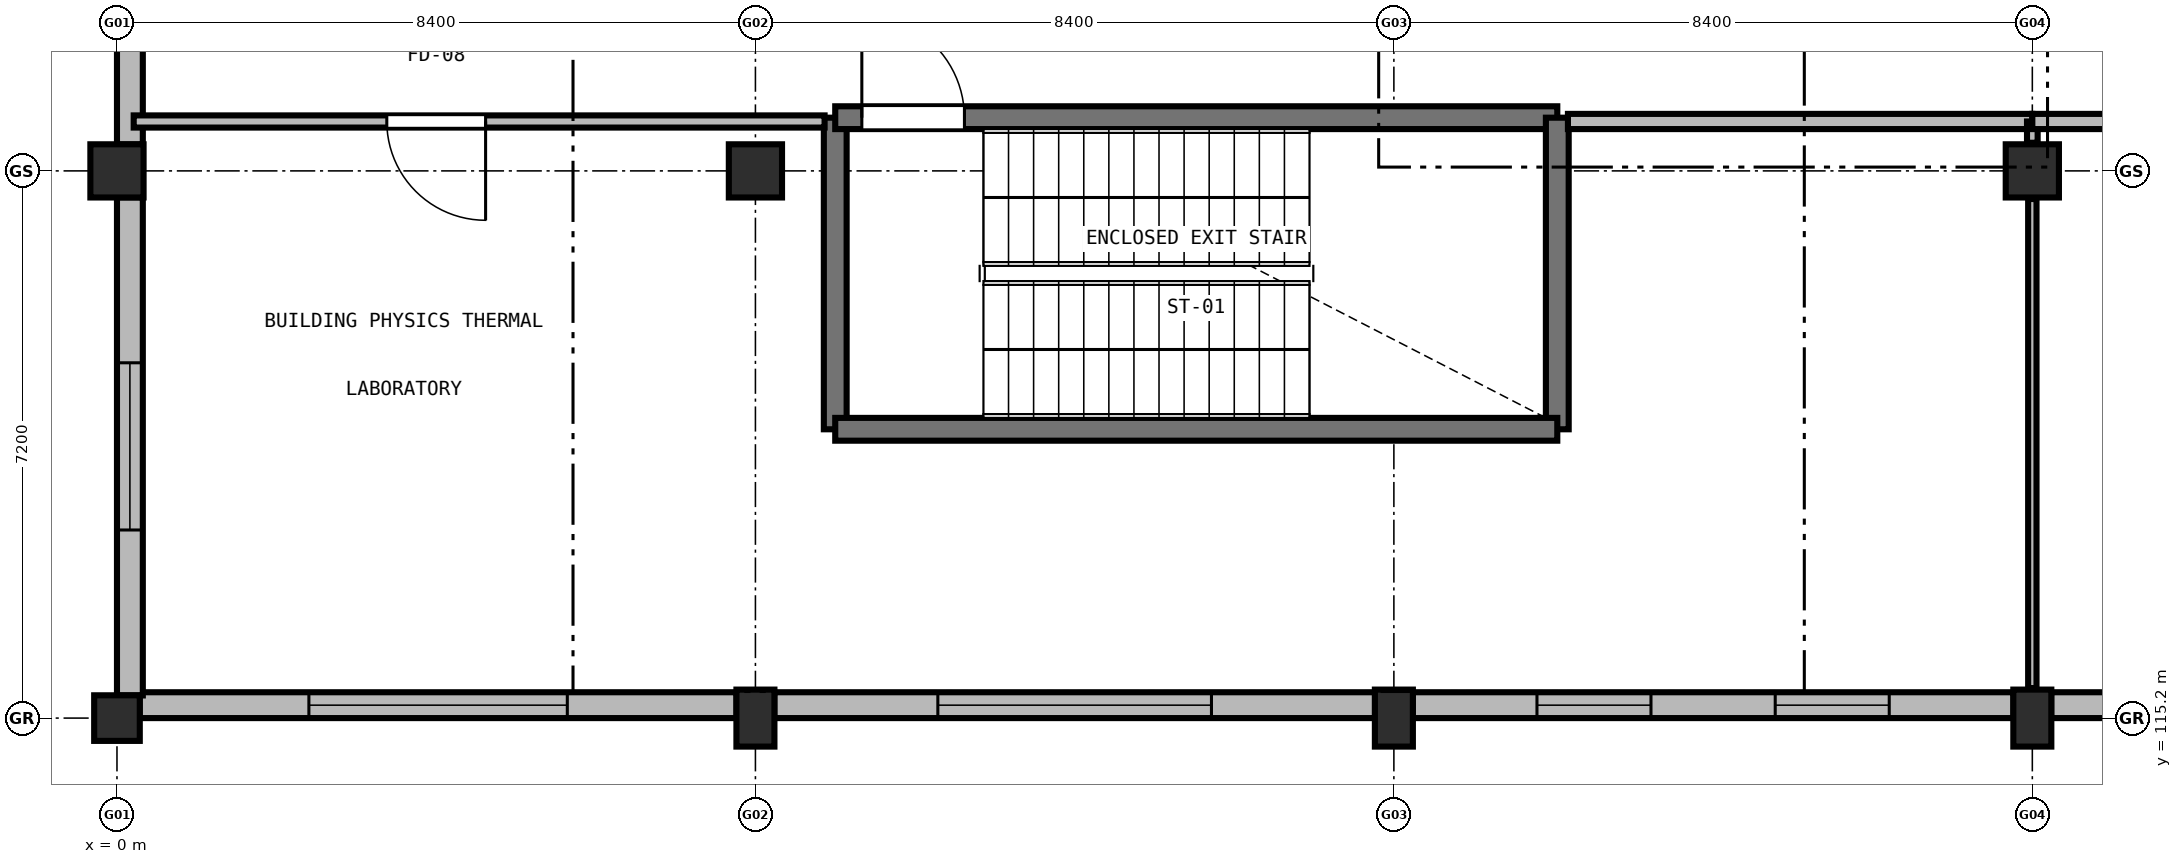
"""IFC4 building model, lengths in metres.
Left out: names, types, materials, properties, quantities, classifications, styles, units other than length and angle.
Written with IfcOpenShell. Run it as: python <this file> out.ifc"""

import sys

from ifc_helpers import new_model, si_unit, direction, frame, frame_2d, origin, origin_2d, place, context, subcontext, project, spatial, rectangle, extrude, element, fill, save


model = new_model("IFC4")
c1 = context("Model", 3, precision=1e-05, world=origin(), true_north=direction((0.0, 1.0)))
c2 = subcontext(c1, "Body", "Model", "MODEL_VIEW")
j1 = project(units=[si_unit("LENGTHUNIT", "METRE"), si_unit("PLANEANGLEUNIT", "RADIAN")], contexts=[c1])
p1 = place(None, origin())
s1 = spatial("IfcSite", under=j1, at=p1, CompositionType="ELEMENT")
p2 = place(p1, origin())
s2 = spatial("IfcBuilding", under=s1, at=p2, CompositionType="ELEMENT")
p3 = place(p2, frame((0.0, 0.0, 9.3)))
s3 = spatial("IfcBuildingStorey", under=s2, at=p3, CompositionType="ELEMENT", Elevation=9.3)
p4 = place(p3, frame((0.0, 115.2, 0.0), z_axis=(0.0, 0.0, 1.0), x_axis=(1.0, 0.0, 0.0)))
e1 = element("IfcColumn", 1, at=p4, inside=s3, PredefinedType="COLUMN", context=c2, shape_type="SweptSolid", body=[
    extrude(rectangle(XDim=0.6, YDim=0.6, at=origin_2d()), origin(), (0.0, 0.0, 1.0), 4.2),
])
p5 = place(p3, frame((0.0, 122.4, 0.0), z_axis=(0.0, 0.0, 1.0), x_axis=(1.0, 0.0, 0.0)))
e2 = element("IfcColumn", 2, at=p5, inside=s3, PredefinedType="COLUMN", context=c2, shape_type="SweptSolid", body=[
    extrude(rectangle(XDim=0.7, YDim=0.7, at=origin_2d()), origin(), (0.0, 0.0, 1.0), 4.2),
])
p6 = place(p3, frame((8.4, 115.2, 0.0), z_axis=(0.0, 0.0, 1.0), x_axis=(1.0, 0.0, 0.0)))
e3 = element("IfcColumn", 3, at=p6, inside=s3, PredefinedType="COLUMN", context=c2, shape_type="SweptSolid", body=[
    extrude(rectangle(XDim=0.5, YDim=0.75, at=origin_2d()), origin(), (0.0, 0.0, 1.0), 4.2),
])
p7 = place(p3, frame((8.4, 122.4, 0.0), z_axis=(0.0, 0.0, 1.0), x_axis=(1.0, 0.0, 0.0)))
e4 = element("IfcColumn", 4, at=p7, inside=s3, PredefinedType="COLUMN", context=c2, shape_type="SweptSolid", body=[
    extrude(rectangle(XDim=0.7, YDim=0.7, at=origin_2d()), origin(), (0.0, 0.0, 1.0), 4.2),
])
for number, where, z_axis, x_axis in (
    (5, (16.8, 115.2, 0.0), (0.0, 0.0, 1.0), (1.0, 0.0, 0.0)),
    (6, (25.2, 115.2, 0.0), (0.0, 0.0, 1.0), (1.0, 0.0, 0.0)),
):
    element("IfcColumn", number, at=place(p3, frame(where, z_axis=z_axis, x_axis=x_axis)), inside=s3, PredefinedType="COLUMN", context=c2, shape_type="SweptSolid", body=[
        extrude(rectangle(XDim=0.5, YDim=0.75, at=origin_2d()), origin(), (0.0, 0.0, 1.0), 4.2),
    ])
p8 = place(p3, frame((25.2, 122.4, 0.0), z_axis=(0.0, 0.0, 1.0), x_axis=(1.0, 0.0, 0.0)))
e7 = element("IfcColumn", 7, at=p8, inside=s3, PredefinedType="COLUMN", context=c2, shape_type="SweptSolid", body=[
    extrude(rectangle(XDim=0.7, YDim=0.7, at=origin_2d()), origin(), (0.0, 0.0, 1.0), 4.2),
])
p9 = place(p3, frame((33.352, 115.37, 0.0), z_axis=(0.0, 0.0, 1.0), x_axis=(-1.0, 0.0, 0.0)))
e8 = element("IfcWall", 8, at=p9, inside=s3, PredefinedType="SOLIDWALL", context=c2, shape_type="SweptSolid", body=[
    extrude(rectangle(XDim=7.904, YDim=0.34, at=frame_2d((3.952, 0.0))), origin(), (0.0, 0.0, 1.0), 3.18),
])
p10 = place(p9, frame((1.301, 0.0, 0.95)))
e9 = element("IfcOpeningElement", 9, at=p10, cuts=e8, PredefinedType="OPENING", context=c2, shape_type="SweptSolid", body=[
    extrude(rectangle(XDim=2.0, YDim=1.5, at=frame_2d((1.0, 0.75))), frame((0.0, 0.18, 0.0), z_axis=(0.0, -1.0, 0.0), x_axis=(1.0, 0.0, 0.0)), (0.0, 0.0, 1.0), 0.36),
])
p11 = place(p9, frame((4.603, 0.0, 0.95)))
e10 = element("IfcOpeningElement", 10, at=p11, cuts=e8, PredefinedType="OPENING", context=c2, shape_type="SweptSolid", body=[
    extrude(rectangle(XDim=2.0, YDim=1.5, at=frame_2d((1.0, 0.75))), frame((0.0, 0.18, 0.0), z_axis=(0.0, -1.0, 0.0), x_axis=(1.0, 0.0, 0.0)), (0.0, 0.0, 1.0), 0.36),
])
p12 = place(p3, frame((24.952, 115.37, 0.0), z_axis=(0.0, 0.0, 1.0), x_axis=(-1.0, 0.0, 0.0)))
e11 = element("IfcWall", 11, at=p12, inside=s3, PredefinedType="SOLIDWALL", context=c2, shape_type="SweptSolid", body=[
    extrude(rectangle(XDim=7.904, YDim=0.34, at=frame_2d((3.952, 0.0))), origin(), (0.0, 0.0, 1.0), 3.18),
])
p13 = place(p12, frame((1.635, 0.0, 0.95)))
e12 = element("IfcOpeningElement", 12, at=p13, cuts=e11, PredefinedType="OPENING", context=c2, shape_type="SweptSolid", body=[
    extrude(rectangle(XDim=1.5, YDim=1.4, at=frame_2d((0.75, 0.7))), frame((0.0, 0.18, 0.0), z_axis=(0.0, -1.0, 0.0), x_axis=(1.0, 0.0, 0.0)), (0.0, 0.0, 1.0), 0.36),
])
p14 = place(p12, frame((4.769, 0.0, 0.95)))
e13 = element("IfcOpeningElement", 13, at=p14, cuts=e11, PredefinedType="OPENING", context=c2, shape_type="SweptSolid", body=[
    extrude(rectangle(XDim=1.5, YDim=1.4, at=frame_2d((0.75, 0.7))), frame((0.0, 0.18, 0.0), z_axis=(0.0, -1.0, 0.0), x_axis=(1.0, 0.0, 0.0)), (0.0, 0.0, 1.0), 0.36),
])
p15 = place(p3, frame((16.552, 115.37, 0.0), z_axis=(0.0, 0.0, 1.0), x_axis=(-1.0, 0.0, 0.0)))
e14 = element("IfcWall", 14, at=p15, inside=s3, PredefinedType="SOLIDWALL", context=c2, shape_type="SweptSolid", body=[
    extrude(rectangle(XDim=7.904, YDim=0.34, at=frame_2d((3.952, 0.0))), origin(), (0.0, 0.0, 1.0), 3.18),
])
p16 = place(p15, frame((2.152, 0.0, 0.95)))
e15 = element("IfcOpeningElement", 15, at=p16, cuts=e14, PredefinedType="OPENING", context=c2, shape_type="SweptSolid", body=[
    extrude(rectangle(XDim=3.6, YDim=1.98, at=frame_2d((1.8, 0.99))), frame((0.0, 0.18, 0.0), z_axis=(0.0, -1.0, 0.0), x_axis=(1.0, 0.0, 0.0)), (0.0, 0.0, 1.0), 0.36),
])
p17 = place(p3, frame((8.152, 115.37, 0.0), z_axis=(0.0, 0.0, 1.0), x_axis=(-1.0, 0.0, 0.0)))
e16 = element("IfcWall", 16, at=p17, inside=s3, PredefinedType="SOLIDWALL", context=c2, shape_type="SweptSolid", body=[
    extrude(rectangle(XDim=7.854, YDim=0.34, at=frame_2d((3.927, 0.0))), origin(), (0.0, 0.0, 1.0), 3.18),
])
p18 = place(p17, frame((2.227, 0.0, 0.95)))
e17 = element("IfcOpeningElement", 17, at=p18, cuts=e16, PredefinedType="OPENING", context=c2, shape_type="SweptSolid", body=[
    extrude(rectangle(XDim=3.4, YDim=1.8, at=frame_2d((1.7, 0.9))), frame((0.0, 0.18, 0.0), z_axis=(0.0, -1.0, 0.0), x_axis=(1.0, 0.0, 0.0)), (0.0, 0.0, 1.0), 0.36),
])
p19 = place(p3, frame((0.17, 115.498, 0.0), z_axis=(0.0, 0.0, 1.0), x_axis=(0.0, 1.0, 0.0)))
e18 = element("IfcWall", 18, at=p19, inside=s3, PredefinedType="SOLIDWALL", context=c2, shape_type="SweptSolid", body=[
    extrude(rectangle(XDim=6.554, YDim=0.34, at=frame_2d((3.277, 0.0))), origin(), (0.0, 0.0, 1.0), 3.33),
])
p20 = place(p19, frame((2.177, 0.0, 0.95)))
e19 = element("IfcOpeningElement", 19, at=p20, cuts=e18, PredefinedType="OPENING", context=c2, shape_type="SweptSolid", body=[
    extrude(rectangle(XDim=2.2, YDim=1.7, at=frame_2d((1.1, 0.85))), frame((0.0, 0.18, 0.0), z_axis=(0.0, -1.0, 0.0), x_axis=(1.0, 0.0, 0.0)), (0.0, 0.0, 1.0), 0.36),
])
p21 = place(p3, frame((0.17, 122.748, 0.0), z_axis=(0.0, 0.0, 1.0), x_axis=(0.0, 1.0, 0.0)))
e20 = element("IfcWall", 20, at=p21, inside=s3, PredefinedType="SOLIDWALL", context=c2, shape_type="SweptSolid", body=[
    extrude(rectangle(XDim=6.504, YDim=0.34, at=frame_2d((3.252, 0.0))), origin(), (0.0, 0.0, 1.0), 3.33),
])
p22 = place(p3, frame((9.45, 119.0, 0.0), z_axis=(0.0, 0.0, 1.0), x_axis=(0.0, 1.0, 0.0)))
e21 = element("IfcWall", 21, at=p22, inside=s3, PredefinedType="SHEAR", context=c2, shape_type="SweptSolid", body=[
    extrude(rectangle(XDim=4.1, YDim=0.3, at=frame_2d((2.05, 0.0))), origin(), (0.0, 0.0, 1.0), 3.94),
])
p23 = place(p3, frame((9.45, 123.1, 0.0), z_axis=(0.0, 0.0, 1.0), x_axis=(1.0, 0.0, 0.0)))
e22 = element("IfcWall", 22, at=p23, inside=s3, PredefinedType="SHEAR", context=c2, shape_type="SweptSolid", body=[
    extrude(rectangle(XDim=9.5, YDim=0.3, at=frame_2d((4.75, 0.0))), origin(), (0.0, 0.0, 1.0), 3.94),
])
p24 = place(p23, frame((0.35, 0.0, 0.0)))
e23 = element("IfcOpeningElement", 23, at=p24, cuts=e22, PredefinedType="OPENING", context=c2, shape_type="SweptSolid", body=[
    extrude(rectangle(XDim=1.35, YDim=2.2, at=frame_2d((0.675, 1.1))), frame((0.0, 0.16, 0.0), z_axis=(0.0, -1.0, 0.0), x_axis=(1.0, 0.0, 0.0)), (0.0, 0.0, 1.0), 0.32),
])
p25 = place(p3, frame((18.95, 123.1, 0.0), z_axis=(0.0, 0.0, 1.0), x_axis=(0.0, -1.0, 0.0)))
e24 = element("IfcWall", 24, at=p25, inside=s3, PredefinedType="SHEAR", context=c2, shape_type="SweptSolid", body=[
    extrude(rectangle(XDim=4.1, YDim=0.3, at=frame_2d((2.05, 0.0))), origin(), (0.0, 0.0, 1.0), 3.94),
])
p26 = place(p3, frame((18.95, 119.0, 0.0), z_axis=(0.0, 0.0, 1.0), x_axis=(-1.0, 0.0, 0.0)))
e25 = element("IfcWall", 25, at=p26, inside=s3, PredefinedType="SHEAR", context=c2, shape_type="SweptSolid", body=[
    extrude(rectangle(XDim=9.5, YDim=0.3, at=frame_2d((4.75, 0.0))), origin(), (0.0, 0.0, 1.0), 3.94),
])
p27 = place(p3, frame((25.2, 123.05, 0.0), z_axis=(0.0, 0.0, 1.0), x_axis=(-1.0, 0.0, 0.0)))
e26 = element("IfcWall", 26, at=p27, inside=s3, PredefinedType="SOLIDWALL", context=c2, shape_type="SweptSolid", body=[
    extrude(rectangle(XDim=6.11, YDim=0.2, at=frame_2d((3.055, 0.0))), origin(), (0.0, 0.0, 1.0), 3.325),
])
p28 = place(p3, frame((9.31, 123.05, 0.0), z_axis=(0.0, 0.0, 1.0), x_axis=(-1.0, 0.0, 0.0)))
e27 = element("IfcWall", 27, at=p28, inside=s3, PredefinedType="PARTITIONING", context=c2, shape_type="SweptSolid", body=[
    extrude(rectangle(XDim=9.09, YDim=0.16, at=frame_2d((4.545, 0.0))), origin(), (0.0, 0.0, 1.0), 3.325),
])
p29 = place(p28, frame((4.46, 0.0, 0.0)))
e28 = element("IfcOpeningElement", 28, at=p29, cuts=e27, PredefinedType="OPENING", context=c2, shape_type="SweptSolid", body=[
    extrude(rectangle(XDim=1.3, YDim=2.15, at=frame_2d((0.65, 1.075))), frame((0.0, 0.09, 0.0), z_axis=(0.0, -1.0, 0.0), x_axis=(1.0, 0.0, 0.0)), (0.0, 0.0, 1.0), 0.18),
])
p30 = place(p3, frame((25.2, 115.595, 0.0), z_axis=(0.0, 0.0, 1.0), x_axis=(0.0, 1.0, 0.0)))
e29 = element("IfcWall", 29, at=p30, inside=s3, PredefinedType="PARTITIONING", context=c2, shape_type="SweptSolid", body=[
    extrude(rectangle(XDim=6.435, YDim=0.11, at=frame_2d((3.218, 0.0))), origin(), (0.0, 0.0, 1.0), 3.175),
])
p31 = place(p3, frame((25.2, 122.77, 0.0), z_axis=(0.0, 0.0, 1.0), x_axis=(0.0, 1.0, 0.0)))
e30 = element("IfcWall", 30, at=p31, inside=s3, PredefinedType="PARTITIONING", context=c2, shape_type="SweptSolid", body=[
    extrude(rectangle(XDim=0.28, YDim=0.14, at=frame_2d((0.14, 0.0))), origin(), (0.0, 0.0, 1.0), 3.175),
])
p32 = place(p3, frame((33.6, 123.05, 0.0), z_axis=(0.0, 0.0, 1.0), x_axis=(-1.0, 0.0, 0.0)))
e31 = element("IfcWall", 31, at=p32, inside=s3, PredefinedType="SOLIDWALL", context=c2, shape_type="SweptSolid", body=[
    extrude(rectangle(XDim=8.4, YDim=0.2, at=frame_2d((4.2, 0.0))), origin(), (0.0, 0.0, 1.0), 3.325),
])
p33 = place(p32, frame((3.675, 0.0, 0.0)))
e32 = element("IfcOpeningElement", 32, at=p33, cuts=e31, PredefinedType="OPENING", context=c2, shape_type="SweptSolid", body=[
    extrude(rectangle(XDim=1.05, YDim=2.15, at=frame_2d((0.525, 1.075))), frame((0.0, 0.11, 0.0), z_axis=(0.0, -1.0, 0.0), x_axis=(1.0, 0.0, 0.0)), (0.0, 0.0, 1.0), 0.22),
])
p34 = place(p13, origin())
e33 = element("IfcWindow", 33, at=p34, inside=s3, PartitioningType="SINGLE_PANEL", PredefinedType="WINDOW", context=c2, shape_type="SweptSolid", body=[
    extrude(rectangle(XDim=1.5, YDim=1.4, at=frame_2d((0.75, 0.7))), frame((0.0, 0.03, 0.0), z_axis=(0.0, -1.0, 0.0), x_axis=(1.0, 0.0, 0.0)), (0.0, 0.0, 1.0), 0.06),
])
fill(e12, e33)
p35 = place(p14, origin())
e34 = element("IfcWindow", 34, at=p35, inside=s3, PartitioningType="SINGLE_PANEL", PredefinedType="WINDOW", context=c2, shape_type="SweptSolid", body=[
    extrude(rectangle(XDim=1.5, YDim=1.4, at=frame_2d((0.75, 0.7))), frame((0.0, 0.03, 0.0), z_axis=(0.0, -1.0, 0.0), x_axis=(1.0, 0.0, 0.0)), (0.0, 0.0, 1.0), 0.06),
])
fill(e13, e34)
p36 = place(p16, origin())
e35 = element("IfcWindow", 35, at=p36, inside=s3, PartitioningType="SINGLE_PANEL", PredefinedType="WINDOW", context=c2, shape_type="SweptSolid", body=[
    extrude(rectangle(XDim=3.6, YDim=1.98, at=frame_2d((1.8, 0.99))), frame((0.0, 0.03, 0.0), z_axis=(0.0, -1.0, 0.0), x_axis=(1.0, 0.0, 0.0)), (0.0, 0.0, 1.0), 0.06),
])
fill(e15, e35)
p37 = place(p18, origin())
e36 = element("IfcWindow", 36, at=p37, inside=s3, PartitioningType="SINGLE_PANEL", PredefinedType="WINDOW", context=c2, shape_type="SweptSolid", body=[
    extrude(rectangle(XDim=3.4, YDim=1.8, at=frame_2d((1.7, 0.9))), frame((0.0, 0.03, 0.0), z_axis=(0.0, -1.0, 0.0), x_axis=(1.0, 0.0, 0.0)), (0.0, 0.0, 1.0), 0.06),
])
fill(e17, e36)
p38 = place(p20, origin())
e37 = element("IfcWindow", 37, at=p38, inside=s3, PartitioningType="SINGLE_PANEL", PredefinedType="WINDOW", context=c2, shape_type="SweptSolid", body=[
    extrude(rectangle(XDim=2.2, YDim=1.7, at=frame_2d((1.1, 0.85))), frame((0.0, 0.03, 0.0), z_axis=(0.0, -1.0, 0.0), x_axis=(1.0, 0.0, 0.0)), (0.0, 0.0, 1.0), 0.06),
])
fill(e19, e37)
p39 = place(p24, origin())
e38 = element("IfcDoor", 38, at=p39, inside=s3, OperationType="SINGLE_SWING_LEFT", PredefinedType="DOOR", context=c2, shape_type="SweptSolid", body=[
    extrude(rectangle(XDim=1.35, YDim=2.2, at=frame_2d((0.675, 1.1))), frame((0.0, 0.025, 0.0), z_axis=(0.0, -1.0, 0.0), x_axis=(1.0, 0.0, 0.0)), (0.0, 0.0, 1.0), 0.05),
])
fill(e23, e38)
p40 = place(p29, origin())
e39 = element("IfcDoor", 39, at=p40, inside=s3, OperationType="SINGLE_SWING_LEFT", PredefinedType="DOOR", context=c2, shape_type="SweptSolid", body=[
    extrude(rectangle(XDim=1.3, YDim=2.15, at=frame_2d((0.65, 1.075))), frame((0.0, 0.025, 0.0), z_axis=(0.0, -1.0, 0.0), x_axis=(1.0, 0.0, 0.0)), (0.0, 0.0, 1.0), 0.05),
])
fill(e28, e39)
save(model, sys.argv[1])
